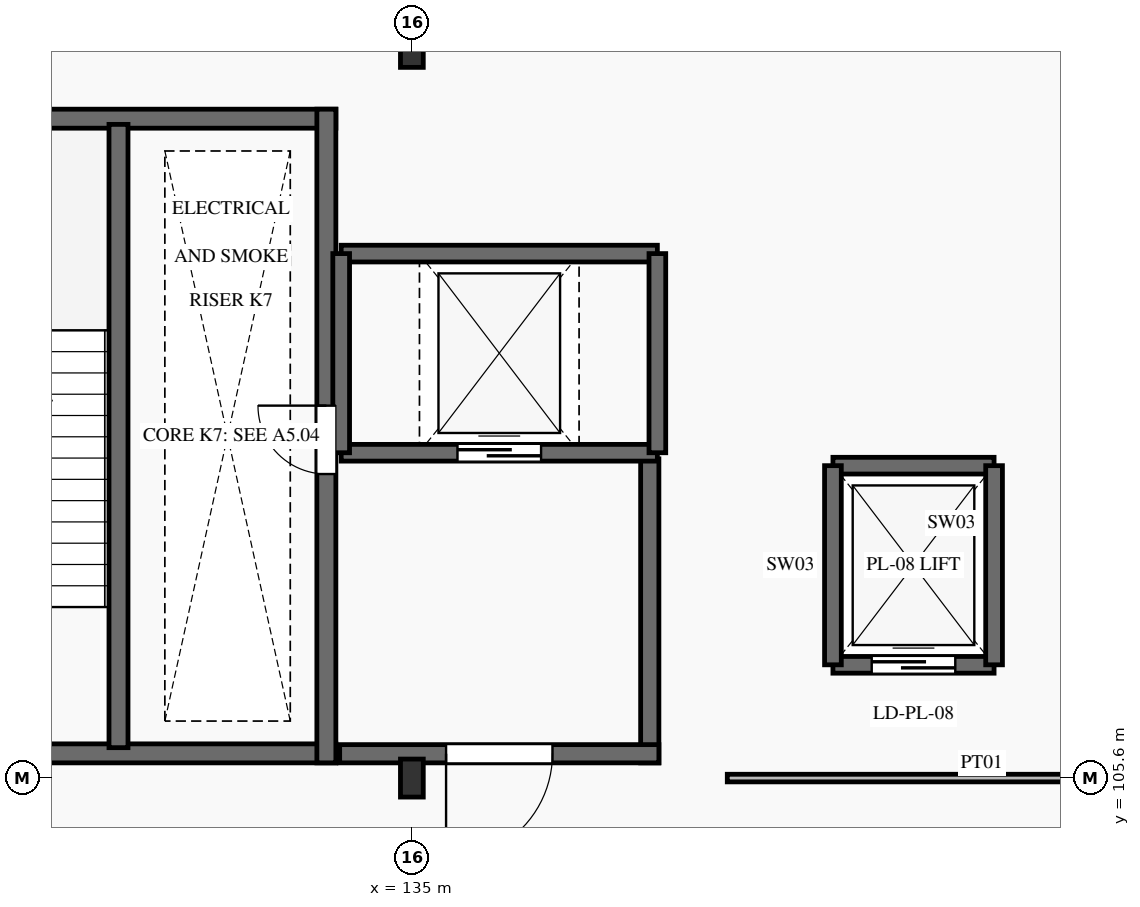
"""IFC4 building model, lengths in metres.
Left out: names, types, materials, properties, quantities, classifications, styles, units other than length and angle.
Written with IfcOpenShell. Run it as: python <this file> out.ifc"""

import sys

from ifc_helpers import new_model, si_unit, direction, frame, frame_2d, origin, origin_2d, place, context, subcontext, project, spatial, rectangle, i_section, extrude, element, fill, save


model = new_model("IFC4")
c1 = context("Model", 3, precision=1e-05, world=origin(), true_north=direction((0.0, 1.0)))
c2 = subcontext(c1, "Body", "Model", "MODEL_VIEW")
j1 = project(units=[si_unit("LENGTHUNIT", "METRE"), si_unit("PLANEANGLEUNIT", "RADIAN")], contexts=[c1])
p1 = place(None, origin())
s1 = spatial("IfcSite", under=j1, at=p1, CompositionType="ELEMENT")
p2 = place(p1, origin())
s2 = spatial("IfcBuilding", under=s1, at=p2, CompositionType="ELEMENT")
p3 = place(p2, frame((0.0, 0.0, 6.0)))
s3 = spatial("IfcBuildingStorey", under=s2, at=p3, CompositionType="ELEMENT", Elevation=6.0)
for number, where, z_axis, x_axis in (
    (1, (135.0, 105.6, 0.0), (0.0, 0.0, 1.0), (1.0, 0.0, 0.0)),
    (2, (135.0, 115.2, 0.0), (0.0, 0.0, 1.0), (1.0, 0.0, 0.0)),
):
    element("IfcColumn", number, at=place(p3, frame(where, z_axis=z_axis, x_axis=x_axis)), inside=s3, PredefinedType="COLUMN", context=c2, shape_type="SweptSolid", body=[
        extrude(i_section(OverallWidth=0.3, OverallDepth=0.5, WebThickness=0.014, FlangeThickness=0.028, FilletRadius=0.027, at=origin_2d()), origin(), (0.0, 0.0, 1.0), 4.8),
    ])
p4 = place(p3, frame((127.0, 105.925, 0.0), z_axis=(0.0, 0.0, 1.0), x_axis=(1.0, 0.0, 0.0)))
e3 = element("IfcWall", 3, at=p4, inside=s3, PredefinedType="SHEAR", context=c2, shape_type="SweptSolid", body=[
    extrude(rectangle(XDim=7.0, YDim=0.25, at=frame_2d((3.5, 0.0))), origin(), (0.0, 0.0, 1.0), 4.8),
])
p5 = place(p4, frame((1.25, 0.0, 0.0)))
e4 = element("IfcOpeningElement", 4, at=p5, cuts=e3, PredefinedType="OPENING", context=c2, shape_type="SweptSolid", body=[
    extrude(rectangle(XDim=1.2, YDim=2.15, at=frame_2d((0.6, 1.075))), frame((0.0, 0.14, 0.0), z_axis=(0.0, -1.0, 0.0), x_axis=(1.0, 0.0, 0.0)), (0.0, 0.0, 1.0), 0.28),
])
p6 = place(p3, frame((127.0, 114.275, 0.0), z_axis=(0.0, 0.0, 1.0), x_axis=(1.0, 0.0, 0.0)))
e5 = element("IfcWall", 5, at=p6, inside=s3, PredefinedType="SHEAR", context=c2, shape_type="SweptSolid", body=[
    extrude(rectangle(XDim=7.0, YDim=0.25, at=frame_2d((3.5, 0.0))), origin(), (0.0, 0.0, 1.0), 4.8),
])
p7 = place(p3, frame((133.875, 105.8, 0.0), z_axis=(0.0, 0.0, 1.0), x_axis=(0.0, 1.0, 0.0)))
e6 = element("IfcWall", 6, at=p7, inside=s3, PredefinedType="SHEAR", context=c2, shape_type="SweptSolid", body=[
    extrude(rectangle(XDim=8.6, YDim=0.25, at=frame_2d((4.3, 0.0))), origin(), (0.0, 0.0, 1.0), 4.8),
])
p8 = place(p7, frame((3.8, 0.0, 0.0)))
e7 = element("IfcOpeningElement", 7, at=p8, cuts=e6, PredefinedType="OPENING", context=c2, shape_type="SweptSolid", body=[
    extrude(rectangle(XDim=0.9, YDim=2.05, at=frame_2d((0.45, 1.025))), frame((0.0, 0.14, 0.0), z_axis=(0.0, -1.0, 0.0), x_axis=(1.0, 0.0, 0.0)), (0.0, 0.0, 1.0), 0.28),
])
p9 = place(p3, frame((131.14, 106.0, 0.0), z_axis=(0.0, 0.0, 1.0), x_axis=(0.0, 1.0, 0.0)))
e8 = element("IfcWall", 8, at=p9, inside=s3, PredefinedType="SHEAR", context=c2, shape_type="SweptSolid", body=[
    extrude(rectangle(XDim=8.2, YDim=0.25, at=frame_2d((4.1, 0.0))), origin(), (0.0, 0.0, 1.0), 4.8),
])
p10 = place(p3, frame((138.13, 105.8, 0.0), z_axis=(0.0, 0.0, 1.0), x_axis=(0.0, 1.0, 0.0)))
e9 = element("IfcWall", 9, at=p10, inside=s3, PredefinedType="SHEAR", context=c2, shape_type="SweptSolid", body=[
    extrude(rectangle(XDim=4.0, YDim=0.24, at=frame_2d((2.0, 0.0))), origin(), (0.0, 0.0, 1.0), 4.8),
])
p11 = place(p3, frame((134.05, 105.92, 0.0), z_axis=(0.0, 0.0, 1.0), x_axis=(1.0, 0.0, 0.0)))
e10 = element("IfcWall", 10, at=p11, inside=s3, PredefinedType="SHEAR", context=c2, shape_type="SweptSolid", body=[
    extrude(rectangle(XDim=4.2, YDim=0.24, at=frame_2d((2.1, 0.0))), origin(), (0.0, 0.0, 1.0), 4.8),
])
p12 = place(p11, frame((1.4, 0.0, 0.0)))
e11 = element("IfcOpeningElement", 11, at=p12, cuts=e10, PredefinedType="OPENING", context=c2, shape_type="SweptSolid", body=[
    extrude(rectangle(XDim=1.4, YDim=2.2, at=frame_2d((0.7, 1.1))), frame((0.0, 0.135, 0.0), z_axis=(0.0, -1.0, 0.0), x_axis=(1.0, 0.0, 0.0)), (0.0, 0.0, 1.0), 0.27),
])
p13 = place(p3, frame((140.54, 107.09, 0.0), z_axis=(0.0, 0.0, 1.0), x_axis=(1.0, 0.0, 0.0)))
e12 = element("IfcWall", 12, at=p13, inside=s3, PredefinedType="SHEAR", context=c2, shape_type="SweptSolid", body=[
    extrude(rectangle(XDim=2.12, YDim=0.22, at=frame_2d((1.06, 0.0))), origin(), (0.0, 0.0, 1.0), 4.8),
])
p14 = place(p13, frame((0.51, 0.0, 0.0)))
e13 = element("IfcOpeningElement", 13, at=p14, cuts=e12, PredefinedType="OPENING", context=c2, shape_type="SweptSolid", body=[
    extrude(rectangle(XDim=1.1, YDim=2.15, at=frame_2d((0.55, 1.075))), frame((0.0, 0.125, 0.0), z_axis=(0.0, -1.0, 0.0), x_axis=(1.0, 0.0, 0.0)), (0.0, 0.0, 1.0), 0.25),
])
p15 = place(p3, frame((140.54, 109.71, 0.0), z_axis=(0.0, 0.0, 1.0), x_axis=(1.0, 0.0, 0.0)))
e14 = element("IfcWall", 14, at=p15, inside=s3, PredefinedType="SHEAR", context=c2, shape_type="SweptSolid", body=[
    extrude(rectangle(XDim=2.12, YDim=0.22, at=frame_2d((1.06, 0.0))), origin(), (0.0, 0.0, 1.0), 4.8),
])
for number, where, z_axis, x_axis in (
    (15, (140.54, 107.09, 0.0), (0.0, 0.0, 1.0), (0.0, 1.0, 0.0)),
    (16, (142.66, 107.09, 0.0), (0.0, 0.0, 1.0), (0.0, 1.0, 0.0)),
):
    element("IfcWall", number, at=place(p3, frame(where, z_axis=z_axis, x_axis=x_axis)), inside=s3, PredefinedType="SHEAR", context=c2, shape_type="SweptSolid", body=[
        extrude(rectangle(XDim=2.62, YDim=0.22, at=frame_2d((1.31, 0.0))), origin(), (0.0, 0.0, 1.0), 4.8),
    ])
p16 = place(p3, frame((134.07, 109.88, 0.0), z_axis=(0.0, 0.0, 1.0), x_axis=(1.0, 0.0, 0.0)))
e17 = element("IfcWall", 17, at=p16, inside=s3, PredefinedType="SHEAR", context=c2, shape_type="SweptSolid", body=[
    extrude(rectangle(XDim=4.16, YDim=0.22, at=frame_2d((2.08, 0.0))), origin(), (0.0, 0.0, 1.0), 4.8),
])
p17 = place(p16, frame((1.53, 0.0, 0.0)))
e18 = element("IfcOpeningElement", 18, at=p17, cuts=e17, PredefinedType="OPENING", context=c2, shape_type="SweptSolid", body=[
    extrude(rectangle(XDim=1.1, YDim=2.15, at=frame_2d((0.55, 1.075))), frame((0.0, 0.125, 0.0), z_axis=(0.0, -1.0, 0.0), x_axis=(1.0, 0.0, 0.0)), (0.0, 0.0, 1.0), 0.25),
])
p18 = place(p3, frame((134.07, 112.5, 0.0), z_axis=(0.0, 0.0, 1.0), x_axis=(1.0, 0.0, 0.0)))
e19 = element("IfcWall", 19, at=p18, inside=s3, PredefinedType="SHEAR", context=c2, shape_type="SweptSolid", body=[
    extrude(rectangle(XDim=4.16, YDim=0.22, at=frame_2d((2.08, 0.0))), origin(), (0.0, 0.0, 1.0), 4.8),
])
for number, where, z_axis, x_axis in (
    (20, (134.07, 109.88, 0.0), (0.0, 0.0, 1.0), (0.0, 1.0, 0.0)),
    (21, (138.23, 109.88, 0.0), (0.0, 0.0, 1.0), (0.0, 1.0, 0.0)),
):
    element("IfcWall", number, at=place(p3, frame(where, z_axis=z_axis, x_axis=x_axis)), inside=s3, PredefinedType="SHEAR", context=c2, shape_type="SweptSolid", body=[
        extrude(rectangle(XDim=2.62, YDim=0.22, at=frame_2d((1.31, 0.0))), origin(), (0.0, 0.0, 1.0), 4.8),
    ])
p19 = place(p3, frame((139.15, 105.6, 0.0), z_axis=(0.0, 0.0, 1.0), x_axis=(1.0, 0.0, 0.0)))
e22 = element("IfcWall", 22, at=p19, inside=s3, PredefinedType="PARTITIONING", context=c2, shape_type="SweptSolid", body=[
    extrude(rectangle(XDim=14.49, YDim=0.1, at=frame_2d((7.245, 0.0))), origin(), (0.0, 0.0, 1.0), 4.23),
])
p20 = place(p19, frame((7.045, 0.0, 0.0)))
e23 = element("IfcOpeningElement", 23, at=p20, cuts=e22, PredefinedType="OPENING", context=c2, shape_type="SweptSolid", body=[
    extrude(rectangle(XDim=1.8, YDim=2.3, at=frame_2d((0.9, 1.15))), frame((0.0, 0.065, 0.0), z_axis=(0.0, -1.0, 0.0), x_axis=(1.0, 0.0, 0.0)), (0.0, 0.0, 1.0), 0.13),
])
p21 = place(p8, origin())
e24 = element("IfcDoor", 24, at=p21, inside=s3, OperationType="SINGLE_SWING_RIGHT", PredefinedType="DOOR", context=c2, shape_type="SweptSolid", body=[
    extrude(rectangle(XDim=0.9, YDim=2.05, at=frame_2d((0.45, 1.025))), frame((0.0, 0.025, 0.0), z_axis=(0.0, -1.0, 0.0), x_axis=(1.0, 0.0, 0.0)), (0.0, 0.0, 1.0), 0.05),
])
fill(e7, e24)
p22 = place(p12, frame((1.4, 0.0, 0.0), z_axis=(0.0, 0.0, 1.0), x_axis=(-1.0, 0.0, 0.0)))
e25 = element("IfcDoor", 25, at=p22, inside=s3, OperationType="SINGLE_SWING_LEFT", PredefinedType="DOOR", context=c2, shape_type="SweptSolid", body=[
    extrude(rectangle(XDim=1.4, YDim=2.2, at=frame_2d((0.7, 1.1))), frame((0.0, 0.025, 0.0), z_axis=(0.0, -1.0, 0.0), x_axis=(1.0, 0.0, 0.0)), (0.0, 0.0, 1.0), 0.05),
])
fill(e11, e25)
p23 = place(p14, origin())
e26 = element("IfcDoor", 26, at=p23, inside=s3, OperationType="SLIDING_TO_RIGHT", PredefinedType="DOOR", context=c2, shape_type="SweptSolid", body=[
    extrude(rectangle(XDim=1.1, YDim=2.15, at=frame_2d((0.55, 1.075))), frame((0.0, 0.025, 0.0), z_axis=(0.0, -1.0, 0.0), x_axis=(1.0, 0.0, 0.0)), (0.0, 0.0, 1.0), 0.05),
])
fill(e13, e26)
p24 = place(p17, origin())
e27 = element("IfcDoor", 27, at=p24, inside=s3, OperationType="SLIDING_TO_RIGHT", PredefinedType="DOOR", context=c2, shape_type="SweptSolid", body=[
    extrude(rectangle(XDim=1.1, YDim=2.15, at=frame_2d((0.55, 1.075))), frame((0.0, 0.025, 0.0), z_axis=(0.0, -1.0, 0.0), x_axis=(1.0, 0.0, 0.0)), (0.0, 0.0, 1.0), 0.05),
])
fill(e18, e27)
save(model, sys.argv[1])
